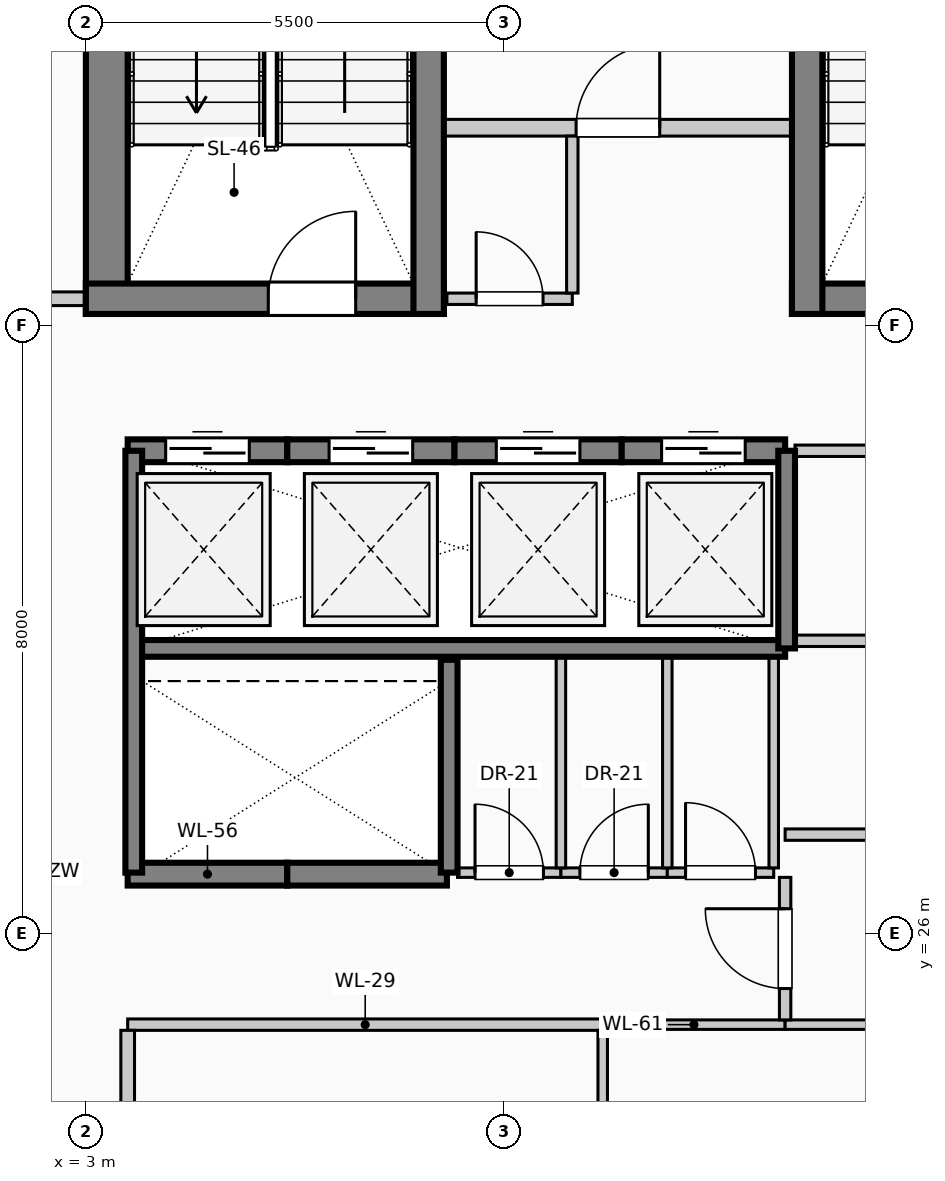
"""IFC4 building model, lengths in metres.
Left out: names, types, materials, properties, quantities, classifications, styles, units other than length and angle.
Written with IfcOpenShell. Run it as: python <this file> out.ifc"""

import sys

from ifc_helpers import new_model, si_unit, direction, frame, frame_2d, origin, place, context, subcontext, project, spatial, rectangle, extrude, element, fill, save


model = new_model("IFC4")
c1 = context("Model", 3, precision=1e-05, world=origin(), true_north=direction((0.0, 1.0)))
c2 = subcontext(c1, "Body", "Model", "MODEL_VIEW")
j1 = project(units=[si_unit("LENGTHUNIT", "METRE"), si_unit("PLANEANGLEUNIT", "RADIAN")], contexts=[c1])
p1 = place(None, origin())
s1 = spatial("IfcSite", under=j1, at=p1, CompositionType="ELEMENT")
p2 = place(p1, origin())
s2 = spatial("IfcBuilding", under=s1, at=p2, CompositionType="ELEMENT")
p3 = place(p2, frame((0.0, 0.0, 285.0)))
s3 = spatial("IfcBuildingStorey", under=s2, at=p3, CompositionType="ELEMENT", Elevation=285.0)
p4 = place(p3, frame((3.275, 34.15, 0.0), z_axis=(0.0, 0.0, 1.0), x_axis=(0.0, 1.0, 0.0)))
e1 = element("IfcWall", 1, at=p4, inside=s3, PredefinedType="SHEAR", context=c2, shape_type="SweptSolid", body=[
    extrude(rectangle(XDim=8.83, YDim=0.55, at=frame_2d((4.415, 0.0))), origin(), (0.0, 0.0, 1.0), 4.0),
])
p5 = place(p3, frame((3.0, 34.35, 0.0), z_axis=(0.0, 0.0, 1.0), x_axis=(1.0, 0.0, 0.0)))
e2 = element("IfcWall", 2, at=p5, inside=s3, PredefinedType="SHEAR", context=c2, shape_type="SweptSolid", body=[
    extrude(rectangle(XDim=4.71, YDim=0.4, at=frame_2d((2.355, 0.0))), origin(), (0.0, 0.0, 1.0), 4.0),
])
p6 = place(p5, frame((2.4, 0.0, 0.0)))
e3 = element("IfcOpeningElement", 3, at=p6, cuts=e2, PredefinedType="OPENING", context=c2, shape_type="SweptSolid", body=[
    extrude(rectangle(XDim=1.15, YDim=2.2, at=frame_2d((0.575, 1.1))), frame((0.0, 0.21, 0.0), z_axis=(0.0, -1.0, 0.0), x_axis=(1.0, 0.0, 0.0)), (0.0, 0.0, 1.0), 0.42),
])
p7 = place(p3, frame((12.29, 34.35, 0.0), z_axis=(0.0, 0.0, 1.0), x_axis=(1.0, 0.0, 0.0)))
e4 = element("IfcWall", 4, at=p7, inside=s3, PredefinedType="SHEAR", context=c2, shape_type="SweptSolid", body=[
    extrude(rectangle(XDim=4.71, YDim=0.4, at=frame_2d((2.355, 0.0))), origin(), (0.0, 0.0, 1.0), 4.0),
])
p8 = place(p7, frame((1.4, 0.0, 0.0)))
e5 = element("IfcOpeningElement", 5, at=p8, cuts=e4, PredefinedType="OPENING", context=c2, shape_type="SweptSolid", body=[
    extrude(rectangle(XDim=1.15, YDim=2.2, at=frame_2d((0.575, 1.1))), frame((0.0, 0.21, 0.0), z_axis=(0.0, -1.0, 0.0), x_axis=(1.0, 0.0, 0.0)), (0.0, 0.0, 1.0), 0.42),
])
for number, where, z_axis, x_axis in (
    (6, (7.51, 34.15, 0.0), (0.0, 0.0, 1.0), (0.0, 1.0, 0.0)),
    (7, (12.49, 34.15, 0.0), (0.0, 0.0, 1.0), (0.0, 1.0, 0.0)),
):
    element("IfcWall", number, at=place(p3, frame(where, z_axis=z_axis, x_axis=x_axis)), inside=s3, PredefinedType="SHEAR", context=c2, shape_type="SweptSolid", body=[
        extrude(rectangle(XDim=8.83, YDim=0.4, at=frame_2d((4.415, 0.0))), origin(), (0.0, 0.0, 1.0), 4.0),
    ])
p9 = place(p3, frame((3.55, 32.35, 0.0), z_axis=(0.0, 0.0, 1.0), x_axis=(1.0, 0.0, 0.0)))
e8 = element("IfcWall", 8, at=p9, inside=s3, PredefinedType="SOLIDWALL", context=c2, shape_type="SweptSolid", body=[
    extrude(rectangle(XDim=2.1, YDim=0.3, at=frame_2d((1.05, 0.0))), origin(), (0.0, 0.0, 1.0), 4.0),
])
p10 = place(p9, frame((0.5, 0.0, 0.0)))
e9 = element("IfcOpeningElement", 9, at=p10, cuts=e8, PredefinedType="OPENING", context=c2, shape_type="SweptSolid", body=[
    extrude(rectangle(XDim=1.1, YDim=2.2, at=frame_2d((0.55, 1.1))), frame((0.0, 0.16, 0.0), z_axis=(0.0, -1.0, 0.0), x_axis=(1.0, 0.0, 0.0)), (0.0, 0.0, 1.0), 0.32),
])
p11 = place(p3, frame((5.65, 32.35, 0.0), z_axis=(0.0, 0.0, 1.0), x_axis=(1.0, 0.0, 0.0)))
e10 = element("IfcWall", 10, at=p11, inside=s3, PredefinedType="SOLIDWALL", context=c2, shape_type="SweptSolid", body=[
    extrude(rectangle(XDim=2.2, YDim=0.3, at=frame_2d((1.1, 0.0))), origin(), (0.0, 0.0, 1.0), 4.0),
])
p12 = place(p11, frame((0.55, 0.0, 0.0)))
e11 = element("IfcOpeningElement", 11, at=p12, cuts=e10, PredefinedType="OPENING", context=c2, shape_type="SweptSolid", body=[
    extrude(rectangle(XDim=1.1, YDim=2.2, at=frame_2d((0.55, 1.1))), frame((0.0, 0.16, 0.0), z_axis=(0.0, -1.0, 0.0), x_axis=(1.0, 0.0, 0.0)), (0.0, 0.0, 1.0), 0.32),
])
p13 = place(p3, frame((7.85, 32.35, 0.0), z_axis=(0.0, 0.0, 1.0), x_axis=(1.0, 0.0, 0.0)))
e12 = element("IfcWall", 12, at=p13, inside=s3, PredefinedType="SOLIDWALL", context=c2, shape_type="SweptSolid", body=[
    extrude(rectangle(XDim=2.2, YDim=0.3, at=frame_2d((1.1, 0.0))), origin(), (0.0, 0.0, 1.0), 4.0),
])
p14 = place(p13, frame((0.55, 0.0, 0.0)))
e13 = element("IfcOpeningElement", 13, at=p14, cuts=e12, PredefinedType="OPENING", context=c2, shape_type="SweptSolid", body=[
    extrude(rectangle(XDim=1.1, YDim=2.2, at=frame_2d((0.55, 1.1))), frame((0.0, 0.16, 0.0), z_axis=(0.0, -1.0, 0.0), x_axis=(1.0, 0.0, 0.0)), (0.0, 0.0, 1.0), 0.32),
])
p15 = place(p3, frame((10.05, 32.35, 0.0), z_axis=(0.0, 0.0, 1.0), x_axis=(1.0, 0.0, 0.0)))
e14 = element("IfcWall", 14, at=p15, inside=s3, PredefinedType="SOLIDWALL", context=c2, shape_type="SweptSolid", body=[
    extrude(rectangle(XDim=2.15, YDim=0.3, at=frame_2d((1.075, 0.0))), origin(), (0.0, 0.0, 1.0), 4.0),
])
p16 = place(p15, frame((0.525, 0.0, 0.0)))
e15 = element("IfcOpeningElement", 15, at=p16, cuts=e14, PredefinedType="OPENING", context=c2, shape_type="SweptSolid", body=[
    extrude(rectangle(XDim=1.1, YDim=2.2, at=frame_2d((0.55, 1.1))), frame((0.0, 0.16, 0.0), z_axis=(0.0, -1.0, 0.0), x_axis=(1.0, 0.0, 0.0)), (0.0, 0.0, 1.0), 0.32),
])
p17 = place(p3, frame((5.65, 26.78, 0.0), z_axis=(0.0, 0.0, 1.0), x_axis=(-1.0, 0.0, 0.0)))
e16 = element("IfcWall", 16, at=p17, inside=s3, PredefinedType="SOLIDWALL", context=c2, shape_type="SweptSolid", body=[
    extrude(rectangle(XDim=2.1, YDim=0.3, at=frame_2d((1.05, 0.0))), origin(), (0.0, 0.0, 1.0), 4.0),
])
p18 = place(p3, frame((7.75, 26.78, 0.0), z_axis=(0.0, 0.0, 1.0), x_axis=(-1.0, 0.0, 0.0)))
e17 = element("IfcWall", 17, at=p18, inside=s3, PredefinedType="SOLIDWALL", context=c2, shape_type="SweptSolid", body=[
    extrude(rectangle(XDim=2.1, YDim=0.3, at=frame_2d((1.05, 0.0))), origin(), (0.0, 0.0, 1.0), 4.0),
])
p19 = place(p3, frame((3.55, 29.75, 0.0), z_axis=(0.0, 0.0, 1.0), x_axis=(1.0, 0.0, 0.0)))
e18 = element("IfcWall", 18, at=p19, inside=s3, PredefinedType="SOLIDWALL", context=c2, shape_type="SweptSolid", body=[
    extrude(rectangle(XDim=8.65, YDim=0.22, at=frame_2d((4.325, 0.0))), origin(), (0.0, 0.0, 1.0), 4.0),
])
p20 = place(p3, frame((3.63, 26.8, 0.0), z_axis=(0.0, 0.0, 1.0), x_axis=(0.0, 1.0, 0.0)))
e19 = element("IfcWall", 19, at=p20, inside=s3, PredefinedType="SOLIDWALL", context=c2, shape_type="SweptSolid", body=[
    extrude(rectangle(XDim=5.55, YDim=0.22, at=frame_2d((2.775, 0.0))), origin(), (0.0, 0.0, 1.0), 4.0),
])
p21 = place(p3, frame((7.78, 26.8, 0.0), z_axis=(0.0, 0.0, 1.0), x_axis=(0.0, 1.0, 0.0)))
e20 = element("IfcWall", 20, at=p21, inside=s3, PredefinedType="SOLIDWALL", context=c2, shape_type="SweptSolid", body=[
    extrude(rectangle(XDim=2.8, YDim=0.22, at=frame_2d((1.4, 0.0))), origin(), (0.0, 0.0, 1.0), 4.0),
])
p22 = place(p3, frame((12.22, 29.75, 0.0), z_axis=(0.0, 0.0, 1.0), x_axis=(0.0, 1.0, 0.0)))
e21 = element("IfcWall", 21, at=p22, inside=s3, PredefinedType="SOLIDWALL", context=c2, shape_type="SweptSolid", body=[
    extrude(rectangle(XDim=2.6, YDim=0.22, at=frame_2d((1.3, 0.0))), origin(), (0.0, 0.0, 1.0), 4.0),
])
p23 = place(p3, frame((7.51, 36.6, 0.0), z_axis=(0.0, 0.0, 1.0), x_axis=(1.0, 0.0, 0.0)))
e22 = element("IfcWall", 22, at=p23, inside=s3, PredefinedType="PARTITIONING", context=c2, shape_type="SweptSolid", body=[
    extrude(rectangle(XDim=4.98, YDim=0.22, at=frame_2d((2.49, 0.0))), origin(), (0.0, 0.0, 1.0), 3.775),
])
p24 = place(p23, frame((1.94, 0.0, 0.0)))
e23 = element("IfcOpeningElement", 23, at=p24, cuts=e22, PredefinedType="OPENING", context=c2, shape_type="SweptSolid", body=[
    extrude(rectangle(XDim=1.1, YDim=2.2, at=frame_2d((0.55, 1.1))), frame((0.0, 0.12, 0.0), z_axis=(0.0, -1.0, 0.0), x_axis=(1.0, 0.0, 0.0)), (0.0, 0.0, 1.0), 0.24),
])
p25 = place(p3, frame((3.55, 24.8, 0.0), z_axis=(0.0, 0.0, 1.0), x_axis=(1.0, 0.0, 0.0)))
e24 = element("IfcWall", 24, at=p25, inside=s3, PredefinedType="PARTITIONING", context=c2, shape_type="SweptSolid", body=[
    extrude(rectangle(XDim=6.25, YDim=0.15, at=frame_2d((3.125, 0.0))), origin(), (0.0, 0.0, 1.0), 3.775),
])
p26 = place(p3, frame((9.8, 24.8, 0.0), z_axis=(0.0, 0.0, 1.0), x_axis=(1.0, 0.0, 0.0)))
e25 = element("IfcWall", 25, at=p26, inside=s3, PredefinedType="PARTITIONING", context=c2, shape_type="SweptSolid", body=[
    extrude(rectangle(XDim=2.4, YDim=0.125, at=frame_2d((1.2, 0.0))), origin(), (0.0, 0.0, 1.0), 3.775),
])
p27 = place(p3, frame((12.2, 24.8, 0.0), z_axis=(0.0, 0.0, 1.0), x_axis=(1.0, 0.0, 0.0)))
e26 = element("IfcWall", 26, at=p27, inside=s3, PredefinedType="PARTITIONING", context=c2, shape_type="SweptSolid", body=[
    extrude(rectangle(XDim=3.65, YDim=0.125, at=frame_2d((1.825, 0.0))), origin(), (0.0, 0.0, 1.0), 3.775),
])
p28 = place(p3, frame((7.89, 26.8, 0.0), z_axis=(0.0, 0.0, 1.0), x_axis=(1.0, 0.0, 0.0)))
e27 = element("IfcWall", 27, at=p28, inside=s3, PredefinedType="PARTITIONING", context=c2, shape_type="SweptSolid", body=[
    extrude(rectangle(XDim=1.36, YDim=0.125, at=frame_2d((0.68, 0.0))), origin(), (0.0, 0.0, 1.0), 3.775),
])
p29 = place(p28, frame((0.23, 0.0, 0.0)))
e28 = element("IfcOpeningElement", 28, at=p29, cuts=e27, PredefinedType="OPENING", context=c2, shape_type="SweptSolid", body=[
    extrude(rectangle(XDim=0.9, YDim=2.1, at=frame_2d((0.45, 1.05))), frame((0.0, 0.073, 0.0), z_axis=(0.0, -1.0, 0.0), x_axis=(1.0, 0.0, 0.0)), (0.0, 0.0, 1.0), 0.145),
])
p30 = place(p3, frame((9.25, 26.8, 0.0), z_axis=(0.0, 0.0, 1.0), x_axis=(1.0, 0.0, 0.0)))
e29 = element("IfcWall", 29, at=p30, inside=s3, PredefinedType="PARTITIONING", context=c2, shape_type="SweptSolid", body=[
    extrude(rectangle(XDim=1.4, YDim=0.125, at=frame_2d((0.7, 0.0))), origin(), (0.0, 0.0, 1.0), 3.775),
])
p31 = place(p30, frame((0.25, 0.0, 0.0)))
e30 = element("IfcOpeningElement", 30, at=p31, cuts=e29, PredefinedType="OPENING", context=c2, shape_type="SweptSolid", body=[
    extrude(rectangle(XDim=0.9, YDim=2.1, at=frame_2d((0.45, 1.05))), frame((0.0, 0.073, 0.0), z_axis=(0.0, -1.0, 0.0), x_axis=(1.0, 0.0, 0.0)), (0.0, 0.0, 1.0), 0.145),
])
p32 = place(p3, frame((10.65, 26.8, 0.0), z_axis=(0.0, 0.0, 1.0), x_axis=(1.0, 0.0, 0.0)))
e31 = element("IfcWall", 31, at=p32, inside=s3, PredefinedType="PARTITIONING", context=c2, shape_type="SweptSolid", body=[
    extrude(rectangle(XDim=1.4, YDim=0.125, at=frame_2d((0.7, 0.0))), origin(), (0.0, 0.0, 1.0), 3.775),
])
p33 = place(p32, frame((0.24, 0.0, 0.0)))
e32 = element("IfcOpeningElement", 32, at=p33, cuts=e31, PredefinedType="OPENING", context=c2, shape_type="SweptSolid", body=[
    extrude(rectangle(XDim=0.92, YDim=2.1, at=frame_2d((0.46, 1.05))), frame((0.0, 0.073, 0.0), z_axis=(0.0, -1.0, 0.0), x_axis=(1.0, 0.0, 0.0)), (0.0, 0.0, 1.0), 0.145),
])
p34 = place(p3, frame((12.2, 27.3, 0.0), z_axis=(0.0, 0.0, 1.0), x_axis=(1.0, 0.0, 0.0)))
e33 = element("IfcWall", 33, at=p34, inside=s3, PredefinedType="PARTITIONING", context=c2, shape_type="SweptSolid", body=[
    extrude(rectangle(XDim=8.8, YDim=0.15, at=frame_2d((4.4, 0.0))), origin(), (0.0, 0.0, 1.0), 3.775),
])
p35 = place(p3, frame((12.33, 29.85, 0.0), z_axis=(0.0, 0.0, 1.0), x_axis=(1.0, 0.0, 0.0)))
e34 = element("IfcWall", 34, at=p35, inside=s3, PredefinedType="PARTITIONING", context=c2, shape_type="SweptSolid", body=[
    extrude(rectangle(XDim=8.67, YDim=0.15, at=frame_2d((4.335, 0.0))), origin(), (0.0, 0.0, 1.0), 3.775),
])
p36 = place(p3, frame((12.33, 32.35, 0.0), z_axis=(0.0, 0.0, 1.0), x_axis=(1.0, 0.0, 0.0)))
e35 = element("IfcWall", 35, at=p36, inside=s3, PredefinedType="PARTITIONING", context=c2, shape_type="SweptSolid", body=[
    extrude(rectangle(XDim=3.52, YDim=0.15, at=frame_2d((1.76, 0.0))), origin(), (0.0, 0.0, 1.0), 3.775),
])
p37 = place(p36, frame((1.285, 0.0, 0.0)))
e36 = element("IfcOpeningElement", 36, at=p37, cuts=e35, PredefinedType="OPENING", context=c2, shape_type="SweptSolid", body=[
    extrude(rectangle(XDim=0.95, YDim=2.15, at=frame_2d((0.475, 1.075))), frame((0.0, 0.085, 0.0), z_axis=(0.0, -1.0, 0.0), x_axis=(1.0, 0.0, 0.0)), (0.0, 0.0, 1.0), 0.17),
])
p38 = place(p3, frame((1.075, 34.35, 0.0), z_axis=(0.0, 0.0, 1.0), x_axis=(1.0, 0.0, 0.0)))
e37 = element("IfcWall", 37, at=p38, inside=s3, PredefinedType="PARTITIONING", context=c2, shape_type="SweptSolid", body=[
    extrude(rectangle(XDim=1.925, YDim=0.18, at=frame_2d((0.962, 0.0))), origin(), (0.0, 0.0, 1.0), 3.775),
])
p39 = place(p3, frame((7.75, 34.35, 0.0), z_axis=(0.0, 0.0, 1.0), x_axis=(1.0, 0.0, 0.0)))
e38 = element("IfcWall", 38, at=p39, inside=s3, PredefinedType="PARTITIONING", context=c2, shape_type="SweptSolid", body=[
    extrude(rectangle(XDim=1.65, YDim=0.15, at=frame_2d((0.825, 0.0))), origin(), (0.0, 0.0, 1.0), 3.775),
])
p40 = place(p39, frame((0.385, 0.0, 0.0)))
e39 = element("IfcOpeningElement", 39, at=p40, cuts=e38, PredefinedType="OPENING", context=c2, shape_type="SweptSolid", body=[
    extrude(rectangle(XDim=0.88, YDim=2.1, at=frame_2d((0.44, 1.05))), frame((0.0, 0.085, 0.0), z_axis=(0.0, -1.0, 0.0), x_axis=(1.0, 0.0, 0.0)), (0.0, 0.0, 1.0), 0.17),
])
p41 = place(p3, frame((3.55, 17.39, 0.0), z_axis=(0.0, 0.0, 1.0), x_axis=(0.0, 1.0, 0.0)))
e40 = element("IfcWall", 40, at=p41, inside=s3, PredefinedType="PARTITIONING", context=c2, shape_type="SweptSolid", body=[
    extrude(rectangle(XDim=7.335, YDim=0.18, at=frame_2d((3.667, 0.0))), origin(), (0.0, 0.0, 1.0), 3.775),
])
p42 = place(p3, frame((9.25, 26.863, 0.0), z_axis=(0.0, 0.0, 1.0), x_axis=(0.0, 1.0, 0.0)))
e41 = element("IfcWall", 41, at=p42, inside=s3, PredefinedType="PARTITIONING", context=c2, shape_type="SweptSolid", body=[
    extrude(rectangle(XDim=2.777, YDim=0.125, at=frame_2d((1.389, 0.0))), origin(), (0.0, 0.0, 1.0), 3.775),
])
p43 = place(p3, frame((9.4, 34.425, 0.0), z_axis=(0.0, 0.0, 1.0), x_axis=(0.0, 1.0, 0.0)))
e42 = element("IfcWall", 42, at=p43, inside=s3, PredefinedType="PARTITIONING", context=c2, shape_type="SweptSolid", body=[
    extrude(rectangle(XDim=2.065, YDim=0.15, at=frame_2d((1.032, 0.0))), origin(), (0.0, 0.0, 1.0), 3.775),
])
p44 = place(p3, frame((9.8, 17.39, 0.0), z_axis=(0.0, 0.0, 1.0), x_axis=(0.0, 1.0, 0.0)))
e43 = element("IfcWall", 43, at=p44, inside=s3, PredefinedType="PARTITIONING", context=c2, shape_type="SweptSolid", body=[
    extrude(rectangle(XDim=7.335, YDim=0.125, at=frame_2d((3.667, 0.0))), origin(), (0.0, 0.0, 1.0), 3.775),
])
for number, where, z_axis, x_axis in (
    (44, (10.65, 26.863, 0.0), (0.0, 0.0, 1.0), (0.0, 1.0, 0.0)),
    (45, (12.05, 26.863, 0.0), (0.0, 0.0, 1.0), (0.0, 1.0, 0.0)),
):
    element("IfcWall", number, at=place(p3, frame(where, z_axis=z_axis, x_axis=x_axis)), inside=s3, PredefinedType="PARTITIONING", context=c2, shape_type="SweptSolid", body=[
        extrude(rectangle(XDim=2.777, YDim=0.125, at=frame_2d((1.389, 0.0))), origin(), (0.0, 0.0, 1.0), 3.775),
    ])
p45 = place(p3, frame((12.2, 24.863, 0.0), z_axis=(0.0, 0.0, 1.0), x_axis=(0.0, 1.0, 0.0)))
e46 = element("IfcWall", 46, at=p45, inside=s3, PredefinedType="PARTITIONING", context=c2, shape_type="SweptSolid", body=[
    extrude(rectangle(XDim=1.875, YDim=0.15, at=frame_2d((0.938, 0.0))), origin(), (0.0, 0.0, 1.0), 3.775),
])
p46 = place(p45, frame((0.413, 0.0, 0.0)))
e47 = element("IfcOpeningElement", 47, at=p46, cuts=e46, PredefinedType="OPENING", context=c2, shape_type="SweptSolid", body=[
    extrude(rectangle(XDim=1.05, YDim=2.15, at=frame_2d((0.525, 1.075))), frame((0.0, 0.085, 0.0), z_axis=(0.0, -1.0, 0.0), x_axis=(1.0, 0.0, 0.0)), (0.0, 0.0, 1.0), 0.17),
])
p47 = place(p10, origin())
e48 = element("IfcDoor", 48, at=p47, inside=s3, OperationType="SLIDING_TO_LEFT", PredefinedType="DOOR", context=c2, shape_type="SweptSolid", body=[
    extrude(rectangle(XDim=1.1, YDim=2.2, at=frame_2d((0.55, 1.1))), frame((0.0, 0.025, 0.0), z_axis=(0.0, -1.0, 0.0), x_axis=(1.0, 0.0, 0.0)), (0.0, 0.0, 1.0), 0.05),
])
fill(e9, e48)
p48 = place(p12, origin())
e49 = element("IfcDoor", 49, at=p48, inside=s3, OperationType="SLIDING_TO_RIGHT", PredefinedType="DOOR", context=c2, shape_type="SweptSolid", body=[
    extrude(rectangle(XDim=1.1, YDim=2.2, at=frame_2d((0.55, 1.1))), frame((0.0, 0.025, 0.0), z_axis=(0.0, -1.0, 0.0), x_axis=(1.0, 0.0, 0.0)), (0.0, 0.0, 1.0), 0.05),
])
fill(e11, e49)
p49 = place(p14, origin())
e50 = element("IfcDoor", 50, at=p49, inside=s3, OperationType="SLIDING_TO_LEFT", PredefinedType="DOOR", context=c2, shape_type="SweptSolid", body=[
    extrude(rectangle(XDim=1.1, YDim=2.2, at=frame_2d((0.55, 1.1))), frame((0.0, 0.025, 0.0), z_axis=(0.0, -1.0, 0.0), x_axis=(1.0, 0.0, 0.0)), (0.0, 0.0, 1.0), 0.05),
])
fill(e13, e50)
p50 = place(p16, origin())
e51 = element("IfcDoor", 51, at=p50, inside=s3, OperationType="SLIDING_TO_RIGHT", PredefinedType="DOOR", context=c2, shape_type="SweptSolid", body=[
    extrude(rectangle(XDim=1.1, YDim=2.2, at=frame_2d((0.55, 1.1))), frame((0.0, 0.025, 0.0), z_axis=(0.0, -1.0, 0.0), x_axis=(1.0, 0.0, 0.0)), (0.0, 0.0, 1.0), 0.05),
])
fill(e15, e51)
p51 = place(p6, origin())
e52 = element("IfcDoor", 52, at=p51, inside=s3, OperationType="SINGLE_SWING_RIGHT", PredefinedType="DOOR", context=c2, shape_type="SweptSolid", body=[
    extrude(rectangle(XDim=1.15, YDim=2.2, at=frame_2d((0.575, 1.1))), frame((0.0, 0.025, 0.0), z_axis=(0.0, -1.0, 0.0), x_axis=(1.0, 0.0, 0.0)), (0.0, 0.0, 1.0), 0.05),
])
fill(e3, e52)
p52 = place(p24, origin())
e53 = element("IfcDoor", 53, at=p52, inside=s3, OperationType="SINGLE_SWING_RIGHT", PredefinedType="DOOR", context=c2, shape_type="SweptSolid", body=[
    extrude(rectangle(XDim=1.1, YDim=2.2, at=frame_2d((0.55, 1.1))), frame((0.0, 0.025, 0.0), z_axis=(0.0, -1.0, 0.0), x_axis=(1.0, 0.0, 0.0)), (0.0, 0.0, 1.0), 0.05),
])
fill(e23, e53)
p53 = place(p29, origin())
e54 = element("IfcDoor", 54, at=p53, inside=s3, OperationType="SINGLE_SWING_LEFT", PredefinedType="DOOR", context=c2, shape_type="SweptSolid", body=[
    extrude(rectangle(XDim=0.9, YDim=2.1, at=frame_2d((0.45, 1.05))), frame((0.0, 0.025, 0.0), z_axis=(0.0, -1.0, 0.0), x_axis=(1.0, 0.0, 0.0)), (0.0, 0.0, 1.0), 0.05),
])
fill(e28, e54)
p54 = place(p31, origin())
e55 = element("IfcDoor", 55, at=p54, inside=s3, OperationType="SINGLE_SWING_RIGHT", PredefinedType="DOOR", context=c2, shape_type="SweptSolid", body=[
    extrude(rectangle(XDim=0.9, YDim=2.1, at=frame_2d((0.45, 1.05))), frame((0.0, 0.025, 0.0), z_axis=(0.0, -1.0, 0.0), x_axis=(1.0, 0.0, 0.0)), (0.0, 0.0, 1.0), 0.05),
])
fill(e30, e55)
p55 = place(p33, origin())
e56 = element("IfcDoor", 56, at=p55, inside=s3, OperationType="SINGLE_SWING_LEFT", PredefinedType="DOOR", context=c2, shape_type="SweptSolid", body=[
    extrude(rectangle(XDim=0.92, YDim=2.1, at=frame_2d((0.46, 1.05))), frame((0.0, 0.025, 0.0), z_axis=(0.0, -1.0, 0.0), x_axis=(1.0, 0.0, 0.0)), (0.0, 0.0, 1.0), 0.05),
])
fill(e32, e56)
p56 = place(p40, origin())
e57 = element("IfcDoor", 57, at=p56, inside=s3, OperationType="SINGLE_SWING_LEFT", PredefinedType="DOOR", context=c2, shape_type="SweptSolid", body=[
    extrude(rectangle(XDim=0.88, YDim=2.1, at=frame_2d((0.44, 1.05))), frame((0.0, 0.025, 0.0), z_axis=(0.0, -1.0, 0.0), x_axis=(1.0, 0.0, 0.0)), (0.0, 0.0, 1.0), 0.05),
])
fill(e39, e57)
p57 = place(p46, origin())
e58 = element("IfcDoor", 58, at=p57, inside=s3, OperationType="SINGLE_SWING_RIGHT", PredefinedType="DOOR", context=c2, shape_type="SweptSolid", body=[
    extrude(rectangle(XDim=1.05, YDim=2.15, at=frame_2d((0.525, 1.075))), frame((0.0, 0.025, 0.0), z_axis=(0.0, -1.0, 0.0), x_axis=(1.0, 0.0, 0.0)), (0.0, 0.0, 1.0), 0.05),
])
fill(e47, e58)
save(model, sys.argv[1])
